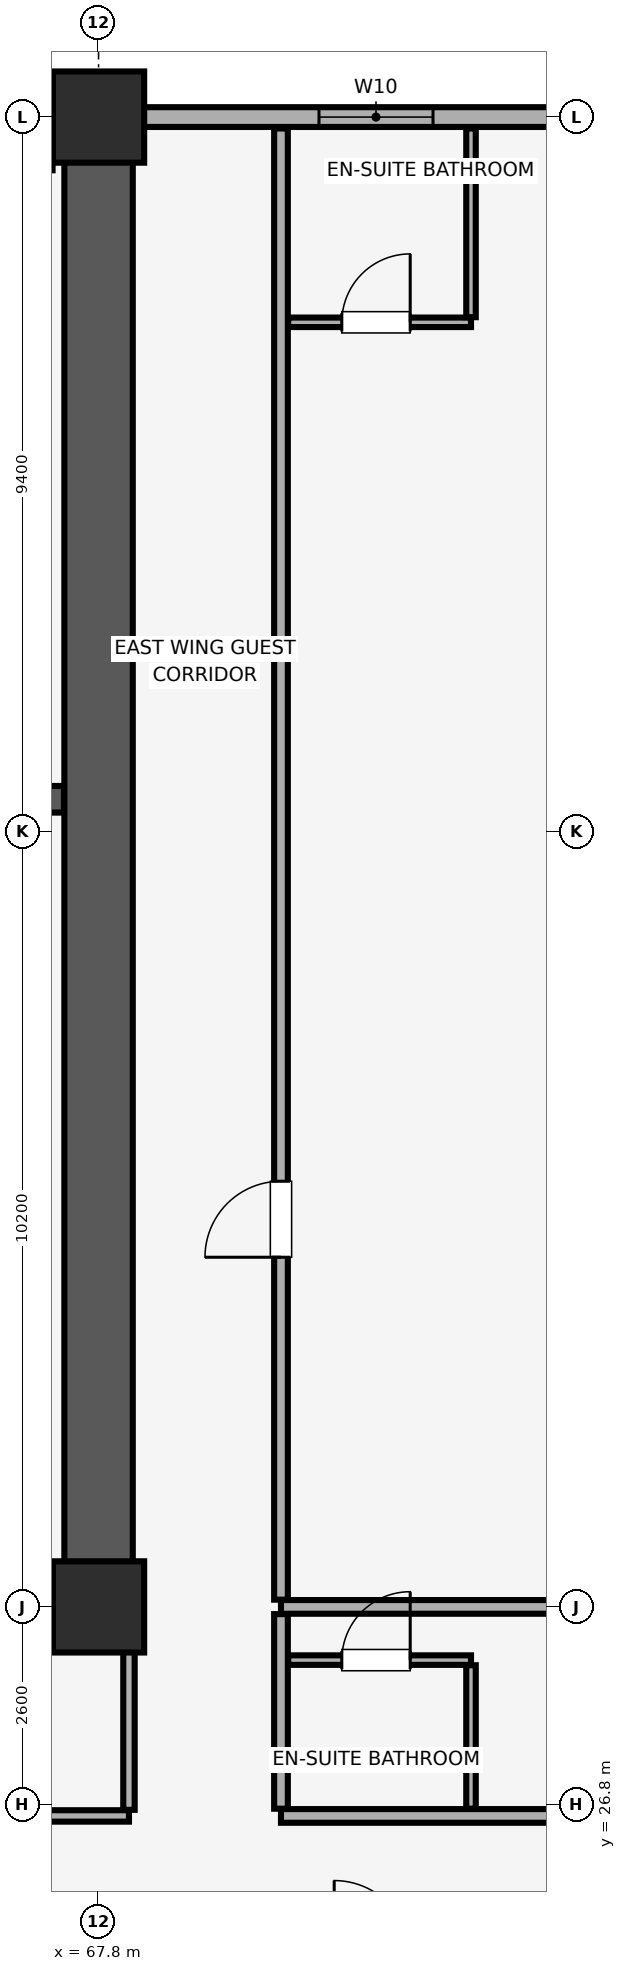
"""IFC4 building model, lengths in metres.
Left out: names, types, materials, properties, quantities, classifications, styles, units other than length and angle.
Written with IfcOpenShell. Run it as: python <this file> out.ifc"""

import sys

from ifc_helpers import new_model, si_unit, direction, frame, frame_2d, origin, origin_2d, place, context, subcontext, project, spatial, rectangle, extrude, element, fill, save


model = new_model("IFC4")
c1 = context("Model", 3, precision=1e-05, world=origin(), true_north=direction((0.0, 1.0)))
c2 = subcontext(c1, "Body", "Model", "MODEL_VIEW")
j1 = project(units=[si_unit("LENGTHUNIT", "METRE"), si_unit("PLANEANGLEUNIT", "RADIAN")], contexts=[c1])
p1 = place(None, origin())
s1 = spatial("IfcSite", under=j1, at=p1, CompositionType="ELEMENT")
p2 = place(p1, origin())
s2 = spatial("IfcBuilding", under=s1, at=p2, CompositionType="ELEMENT")
p3 = place(p2, frame((0.0, 0.0, 126.8)))
s3 = spatial("IfcBuildingStorey", under=s2, at=p3, CompositionType="ELEMENT", Elevation=126.8)
for number, where, z_axis, x_axis in (
    (1, (67.8, 29.4, 0.0), (0.0, 0.0, 1.0), (1.0, 0.0, 0.0)),
    (2, (67.8, 49.0, 0.0), (0.0, 0.0, 1.0), (1.0, 0.0, 0.0)),
):
    element("IfcColumn", number, at=place(p3, frame(where, z_axis=z_axis, x_axis=x_axis)), inside=s3, PredefinedType="COLUMN", context=c2, shape_type="SweptSolid", body=[
        extrude(rectangle(XDim=1.2, YDim=1.2, at=origin_2d()), origin(), (0.0, 0.0, 1.0), 3.51),
    ])
p4 = place(p3, frame((79.8, 49.0, 0.0), z_axis=(0.0, 0.0, 1.0), x_axis=(-1.0, 0.0, 0.0)))
e3 = element("IfcWall", 3, at=p4, inside=s3, PredefinedType="SOLIDWALL", context=c2, shape_type="SweptSolid", body=[
    extrude(rectangle(XDim=75.6, YDim=0.26, at=frame_2d((37.8, 0.0))), origin(), (0.0, 0.0, 1.0), 2.56),
])
p5 = place(p4, frame((72.565, 0.0, 0.85)))
e4 = element("IfcOpeningElement", 4, at=p5, cuts=e3, PredefinedType="OPENING", context=c2, shape_type="SweptSolid", body=[
    extrude(rectangle(XDim=1.5, YDim=1.4, at=frame_2d((0.75, 0.7))), frame((0.0, 0.14, 0.0), z_axis=(0.0, -1.0, 0.0), x_axis=(1.0, 0.0, 0.0)), (0.0, 0.0, 1.0), 0.28),
])
p6 = place(p4, frame((67.45, 0.0, 0.85)))
e5 = element("IfcOpeningElement", 5, at=p6, cuts=e3, PredefinedType="OPENING", context=c2, shape_type="SweptSolid", body=[
    extrude(rectangle(XDim=1.5, YDim=1.4, at=frame_2d((0.75, 0.7))), frame((0.0, 0.14, 0.0), z_axis=(0.0, -1.0, 0.0), x_axis=(1.0, 0.0, 0.0)), (0.0, 0.0, 1.0), 0.28),
])
p7 = place(p4, frame((7.6, 0.0, 0.85)))
e6 = element("IfcOpeningElement", 6, at=p7, cuts=e3, PredefinedType="OPENING", context=c2, shape_type="SweptSolid", body=[
    extrude(rectangle(XDim=1.5, YDim=1.4, at=frame_2d((0.75, 0.7))), frame((0.0, 0.14, 0.0), z_axis=(0.0, -1.0, 0.0), x_axis=(1.0, 0.0, 0.0)), (0.0, 0.0, 1.0), 0.28),
])
p8 = place(p4, frame((1.535, 0.0, 0.85)))
e7 = element("IfcOpeningElement", 7, at=p8, cuts=e3, PredefinedType="OPENING", context=c2, shape_type="SweptSolid", body=[
    extrude(rectangle(XDim=1.5, YDim=1.4, at=frame_2d((0.75, 0.7))), frame((0.0, 0.14, 0.0), z_axis=(0.0, -1.0, 0.0), x_axis=(1.0, 0.0, 0.0)), (0.0, 0.0, 1.0), 0.28),
])
p9 = place(p4, frame((52.265, 0.0, 0.9)))
e8 = element("IfcOpeningElement", 8, at=p9, cuts=e3, PredefinedType="OPENING", context=c2, shape_type="SweptSolid", body=[
    extrude(rectangle(XDim=1.5, YDim=1.4, at=frame_2d((0.75, 0.7))), frame((0.0, 0.14, 0.0), z_axis=(0.0, -1.0, 0.0), x_axis=(1.0, 0.0, 0.0)), (0.0, 0.0, 1.0), 0.28),
])
p10 = place(p4, frame((45.5, 0.0, 0.9)))
e9 = element("IfcOpeningElement", 9, at=p10, cuts=e3, PredefinedType="OPENING", context=c2, shape_type="SweptSolid", body=[
    extrude(rectangle(XDim=1.5, YDim=1.4, at=frame_2d((0.75, 0.7))), frame((0.0, 0.14, 0.0), z_axis=(0.0, -1.0, 0.0), x_axis=(1.0, 0.0, 0.0)), (0.0, 0.0, 1.0), 0.28),
])
p11 = place(p4, frame((31.05, 0.0, 0.9)))
e10 = element("IfcOpeningElement", 10, at=p11, cuts=e3, PredefinedType="OPENING", context=c2, shape_type="SweptSolid", body=[
    extrude(rectangle(XDim=1.5, YDim=1.4, at=frame_2d((0.75, 0.7))), frame((0.0, 0.14, 0.0), z_axis=(0.0, -1.0, 0.0), x_axis=(1.0, 0.0, 0.0)), (0.0, 0.0, 1.0), 0.28),
])
p12 = place(p4, frame((27.85, 0.0, 0.9)))
e11 = element("IfcOpeningElement", 11, at=p12, cuts=e3, PredefinedType="OPENING", context=c2, shape_type="SweptSolid", body=[
    extrude(rectangle(XDim=1.5, YDim=1.4, at=frame_2d((0.75, 0.7))), frame((0.0, 0.14, 0.0), z_axis=(0.0, -1.0, 0.0), x_axis=(1.0, 0.0, 0.0)), (0.0, 0.0, 1.0), 0.28),
])
p13 = place(p4, frame((23.485, 0.0, 0.9)))
e12 = element("IfcOpeningElement", 12, at=p13, cuts=e3, PredefinedType="OPENING", context=c2, shape_type="SweptSolid", body=[
    extrude(rectangle(XDim=1.5, YDim=1.4, at=frame_2d((0.75, 0.7))), frame((0.0, 0.14, 0.0), z_axis=(0.0, -1.0, 0.0), x_axis=(1.0, 0.0, 0.0)), (0.0, 0.0, 1.0), 0.28),
])
p14 = place(p3, frame((67.8, 29.4, 0.0), z_axis=(0.0, 0.0, 1.0), x_axis=(0.0, 1.0, 0.0)))
e13 = element("IfcWall", 13, at=p14, inside=s3, PredefinedType="SHEAR", context=c2, shape_type="SweptSolid", body=[
    extrude(rectangle(XDim=19.2, YDim=0.9, at=frame_2d((9.6, 0.0))), origin(), (0.0, 0.0, 1.0), 3.51),
])
p15 = place(p3, frame((60.4, 29.4, 0.0), z_axis=(0.0, 0.0, 1.0), x_axis=(1.0, 0.0, 0.0)))
e14 = element("IfcWall", 14, at=p15, inside=s3, PredefinedType="SHEAR", context=c2, shape_type="SweptSolid", body=[
    extrude(rectangle(XDim=6.945, YDim=0.9, at=frame_2d((3.473, 0.0))), origin(), (0.0, 0.0, 1.0), 3.51),
])
p16 = place(p3, frame((63.145, 40.025, 0.0), z_axis=(0.0, 0.0, 1.0), x_axis=(1.0, 0.0, 0.0)))
e15 = element("IfcWall", 15, at=p16, inside=s3, PredefinedType="SHEAR", context=c2, shape_type="SweptSolid", body=[
    extrude(rectangle(XDim=4.2, YDim=0.35, at=frame_2d((2.1, 0.0))), origin(), (0.0, 0.0, 1.0), 3.51),
])
p17 = place(p16, frame((1.24, 0.0, 0.0)))
e16 = element("IfcOpeningElement", 16, at=p17, cuts=e15, PredefinedType="OPENING", context=c2, shape_type="SweptSolid", body=[
    extrude(rectangle(XDim=1.15, YDim=2.15, at=frame_2d((0.575, 1.075))), frame((0.0, 0.185, 0.0), z_axis=(0.0, -1.0, 0.0), x_axis=(1.0, 0.0, 0.0)), (0.0, 0.0, 1.0), 0.37),
])
p18 = place(p3, frame((54.28, 26.65, 0.0), z_axis=(0.0, 0.0, 1.0), x_axis=(1.0, 0.0, 0.0)))
e17 = element("IfcWall", 17, at=p18, inside=s3, PredefinedType="PARTITIONING", context=c2, shape_type="SweptSolid", body=[
    extrude(rectangle(XDim=13.92, YDim=0.15, at=frame_2d((6.96, 0.0))), origin(), (0.0, 0.0, 1.0), 3.51),
])
p19 = place(p18, frame((7.17, 0.0, 0.0)))
e18 = element("IfcOpeningElement", 18, at=p19, cuts=e17, PredefinedType="OPENING", context=c2, shape_type="SweptSolid", body=[
    extrude(rectangle(XDim=1.0, YDim=2.15, at=frame_2d((0.5, 1.075))), frame((0.0, 0.085, 0.0), z_axis=(0.0, -1.0, 0.0), x_axis=(1.0, 0.0, 0.0)), (0.0, 0.0, 1.0), 0.17),
])
p20 = place(p3, frame((68.2, 26.73, 0.0), z_axis=(0.0, 0.0, 1.0), x_axis=(0.0, 1.0, 0.0)))
e19 = element("IfcWall", 19, at=p20, inside=s3, PredefinedType="PARTITIONING", context=c2, shape_type="SweptSolid", body=[
    extrude(rectangle(XDim=2.66, YDim=0.15, at=frame_2d((1.33, 0.0))), origin(), (0.0, 0.0, 1.0), 3.51),
])
p21 = place(p3, frame((70.2, 26.65, 0.0), z_axis=(0.0, 0.0, 1.0), x_axis=(1.0, 0.0, 0.0)))
e20 = element("IfcWall", 20, at=p21, inside=s3, PredefinedType="PARTITIONING", context=c2, shape_type="SweptSolid", body=[
    extrude(rectangle(XDim=13.65, YDim=0.18, at=frame_2d((6.825, 0.0))), origin(), (0.0, 0.0, 1.0), 3.51),
])
p22 = place(p21, frame((6.965, 0.0, 0.0)))
e21 = element("IfcOpeningElement", 21, at=p22, cuts=e20, PredefinedType="OPENING", context=c2, shape_type="SweptSolid", body=[
    extrude(rectangle(XDim=1.0, YDim=2.15, at=frame_2d((0.5, 1.075))), frame((0.0, 0.1, 0.0), z_axis=(0.0, -1.0, 0.0), x_axis=(1.0, 0.0, 0.0)), (0.0, 0.0, 1.0), 0.2),
])
p23 = place(p3, frame((70.2, 29.4, 0.0), z_axis=(0.0, 0.0, 1.0), x_axis=(1.0, 0.0, 0.0)))
e22 = element("IfcWall", 22, at=p23, inside=s3, PredefinedType="PARTITIONING", context=c2, shape_type="SweptSolid", body=[
    extrude(rectangle(XDim=13.65, YDim=0.18, at=frame_2d((6.825, 0.0))), origin(), (0.0, 0.0, 1.0), 2.669),
])
p24 = place(p3, frame((70.2, 26.745, 0.0), z_axis=(0.0, 0.0, 1.0), x_axis=(0.0, 1.0, 0.0)))
e23 = element("IfcWall", 23, at=p24, inside=s3, PredefinedType="PARTITIONING", context=c2, shape_type="SweptSolid", body=[
    extrude(rectangle(XDim=2.56, YDim=0.18, at=frame_2d((1.28, 0.0))), origin(), (0.0, 0.0, 1.0), 3.51),
])
p25 = place(p3, frame((70.295, 28.7, 0.0), z_axis=(0.0, 0.0, 1.0), x_axis=(1.0, 0.0, 0.0)))
e24 = element("IfcWall", 24, at=p25, inside=s3, PredefinedType="PARTITIONING", context=c2, shape_type="SweptSolid", body=[
    extrude(rectangle(XDim=2.405, YDim=0.125, at=frame_2d((1.203, 0.0))), origin(), (0.0, 0.0, 1.0), 3.51),
])
p26 = place(p25, frame((0.705, 0.0, 0.0)))
e25 = element("IfcOpeningElement", 25, at=p26, cuts=e24, PredefinedType="OPENING", context=c2, shape_type="SweptSolid", body=[
    extrude(rectangle(XDim=0.9, YDim=2.1, at=frame_2d((0.45, 1.05))), frame((0.0, 0.073, 0.0), z_axis=(0.0, -1.0, 0.0), x_axis=(1.0, 0.0, 0.0)), (0.0, 0.0, 1.0), 0.145),
])
p27 = place(p3, frame((72.7, 26.745, 0.0), z_axis=(0.0, 0.0, 1.0), x_axis=(0.0, 1.0, 0.0)))
e26 = element("IfcWall", 26, at=p27, inside=s3, PredefinedType="PARTITIONING", context=c2, shape_type="SweptSolid", body=[
    extrude(rectangle(XDim=1.887, YDim=0.125, at=frame_2d((0.944, 0.0))), origin(), (0.0, 0.0, 1.0), 3.51),
])
p28 = place(p3, frame((70.2, 29.495, 0.0), z_axis=(0.0, 0.0, 1.0), x_axis=(0.0, 1.0, 0.0)))
e27 = element("IfcWall", 27, at=p28, inside=s3, PredefinedType="PARTITIONING", context=c2, shape_type="SweptSolid", body=[
    extrude(rectangle(XDim=19.355, YDim=0.18, at=frame_2d((9.677, 0.0))), origin(), (0.0, 0.0, 1.0), 3.51),
])
p29 = place(p28, frame((4.505, 0.0, 0.0)))
e28 = element("IfcOpeningElement", 28, at=p29, cuts=e27, PredefinedType="OPENING", context=c2, shape_type="SweptSolid", body=[
    extrude(rectangle(XDim=1.0, YDim=2.15, at=frame_2d((0.5, 1.075))), frame((0.0, 0.1, 0.0), z_axis=(0.0, -1.0, 0.0), x_axis=(1.0, 0.0, 0.0)), (0.0, 0.0, 1.0), 0.2),
])
p30 = place(p3, frame((70.295, 46.3, 0.0), z_axis=(0.0, 0.0, 1.0), x_axis=(1.0, 0.0, 0.0)))
e29 = element("IfcWall", 29, at=p30, inside=s3, PredefinedType="PARTITIONING", context=c2, shape_type="SweptSolid", body=[
    extrude(rectangle(XDim=2.405, YDim=0.125, at=frame_2d((1.203, 0.0))), origin(), (0.0, 0.0, 1.0), 3.51),
])
p31 = place(p30, frame((0.705, 0.0, 0.0)))
e30 = element("IfcOpeningElement", 30, at=p31, cuts=e29, PredefinedType="OPENING", context=c2, shape_type="SweptSolid", body=[
    extrude(rectangle(XDim=0.9, YDim=2.1, at=frame_2d((0.45, 1.05))), frame((0.0, 0.073, 0.0), z_axis=(0.0, -1.0, 0.0), x_axis=(1.0, 0.0, 0.0)), (0.0, 0.0, 1.0), 0.145),
])
p32 = place(p3, frame((72.7, 46.367, 0.0), z_axis=(0.0, 0.0, 1.0), x_axis=(0.0, 1.0, 0.0)))
e31 = element("IfcWall", 31, at=p32, inside=s3, PredefinedType="PARTITIONING", context=c2, shape_type="SweptSolid", body=[
    extrude(rectangle(XDim=2.483, YDim=0.125, at=frame_2d((1.241, 0.0))), origin(), (0.0, 0.0, 1.0), 3.51),
])
p33 = place(p7, origin())
e32 = element("IfcWindow", 32, at=p33, inside=s3, PartitioningType="SINGLE_PANEL", PredefinedType="WINDOW", context=c2, shape_type="SweptSolid", body=[
    extrude(rectangle(XDim=1.5, YDim=1.4, at=frame_2d((0.75, 0.7))), frame((0.0, 0.03, 0.0), z_axis=(0.0, -1.0, 0.0), x_axis=(1.0, 0.0, 0.0)), (0.0, 0.0, 1.0), 0.06),
])
fill(e6, e32)
p34 = place(p26, origin())
e33 = element("IfcDoor", 33, at=p34, inside=s3, OperationType="SINGLE_SWING_RIGHT", PredefinedType="DOOR", context=c2, shape_type="SweptSolid", body=[
    extrude(rectangle(XDim=0.9, YDim=2.1, at=frame_2d((0.45, 1.05))), frame((0.0, 0.025, 0.0), z_axis=(0.0, -1.0, 0.0), x_axis=(1.0, 0.0, 0.0)), (0.0, 0.0, 1.0), 0.05),
])
fill(e25, e33)
p35 = place(p29, origin())
e34 = element("IfcDoor", 34, at=p35, inside=s3, OperationType="SINGLE_SWING_LEFT", PredefinedType="DOOR", context=c2, shape_type="SweptSolid", body=[
    extrude(rectangle(XDim=1.0, YDim=2.15, at=frame_2d((0.5, 1.075))), frame((0.0, 0.025, 0.0), z_axis=(0.0, -1.0, 0.0), x_axis=(1.0, 0.0, 0.0)), (0.0, 0.0, 1.0), 0.05),
])
fill(e28, e34)
p36 = place(p31, origin())
e35 = element("IfcDoor", 35, at=p36, inside=s3, OperationType="SINGLE_SWING_RIGHT", PredefinedType="DOOR", context=c2, shape_type="SweptSolid", body=[
    extrude(rectangle(XDim=0.9, YDim=2.1, at=frame_2d((0.45, 1.05))), frame((0.0, 0.025, 0.0), z_axis=(0.0, -1.0, 0.0), x_axis=(1.0, 0.0, 0.0)), (0.0, 0.0, 1.0), 0.05),
])
fill(e30, e35)
save(model, sys.argv[1])
